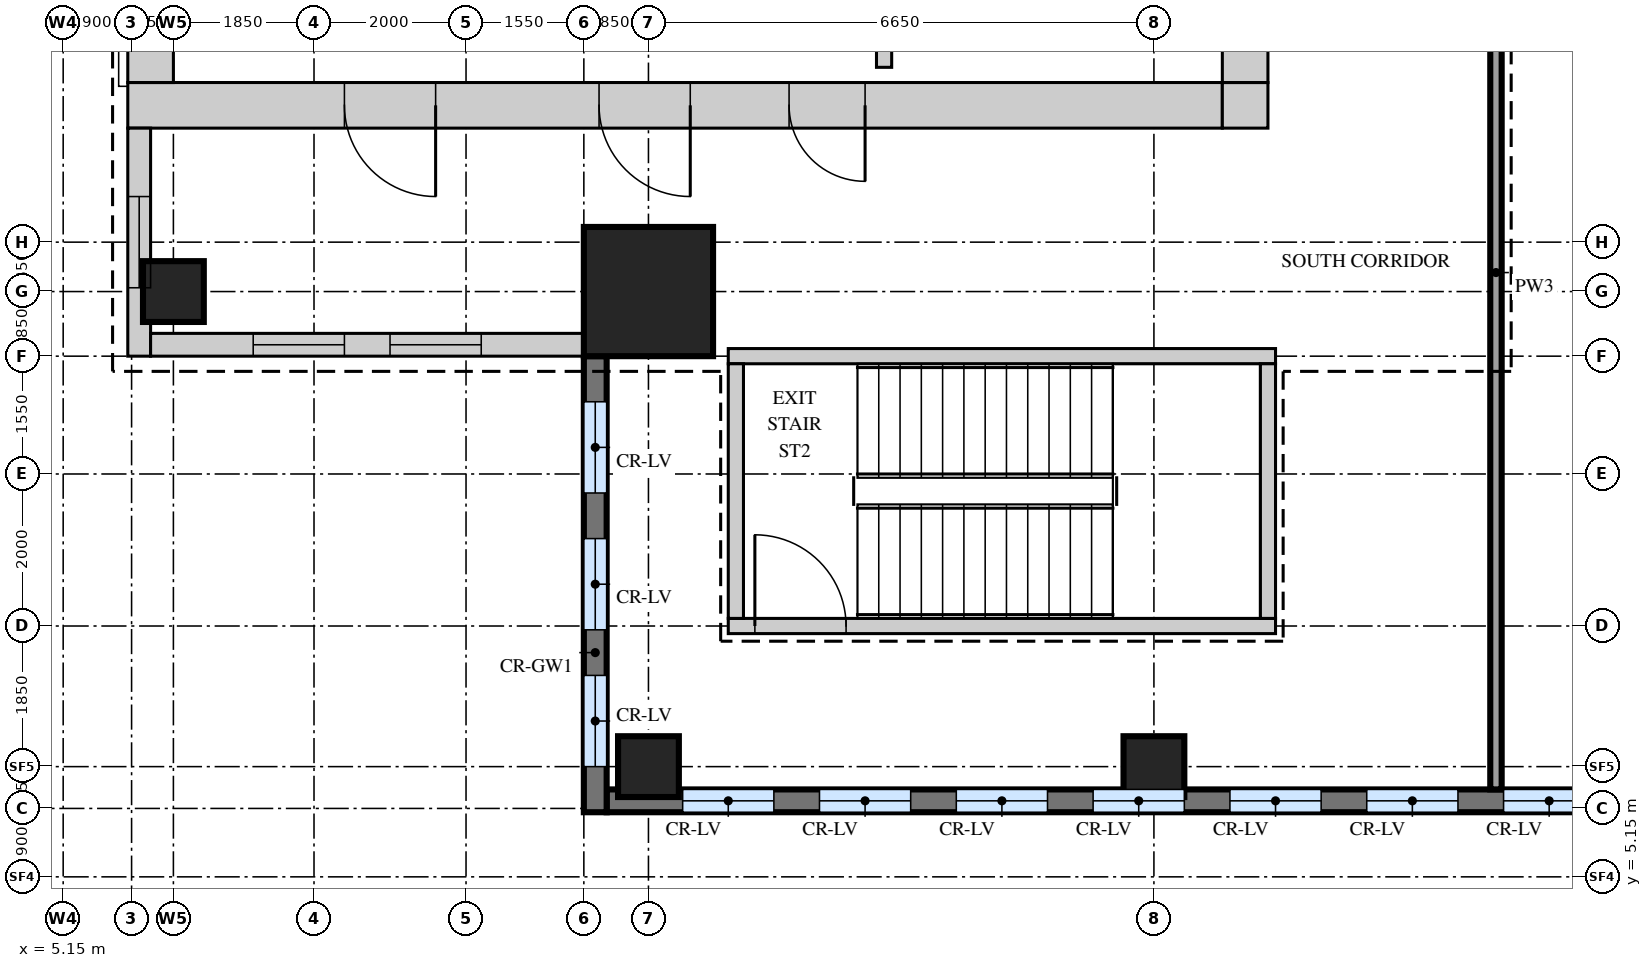
"""IFC4 building model, lengths in metres.
Left out: names, types, materials, properties, quantities, classifications, styles, units other than length and angle.
Written with IfcOpenShell. Run it as: python <this file> out.ifc"""

import sys

from ifc_helpers import new_model, si_unit, direction, frame, frame_2d, origin, origin_2d, place, context, subcontext, project, spatial, rectangle, extrude, source, transform, mapped, element, fill, save


model = new_model("IFC4")
c1 = context("Model", 3, precision=1e-05, world=origin(), true_north=direction((0.0, 1.0)))
c2 = subcontext(c1, "Body", "Model", "MODEL_VIEW")
j1 = project(units=[si_unit("LENGTHUNIT", "METRE"), si_unit("PLANEANGLEUNIT", "RADIAN")], contexts=[c1])
p1 = place(None, origin())
s1 = spatial("IfcSite", under=j1, at=p1, CompositionType="ELEMENT")
p2 = place(p1, origin())
s2 = spatial("IfcBuilding", under=s1, at=p2, CompositionType="ELEMENT")
p3 = place(p2, frame((0.0, 0.0, 343.7)))
s3 = spatial("IfcBuildingStorey", under=s2, at=p3, CompositionType="ELEMENT", Elevation=343.7)
m1 = source(origin(), c2, "Body", "SweptSolid", [
    extrude(rectangle(XDim=14.4, YDim=0.6, at=frame_2d((7.2, 0.0))), origin(), (0.0, 0.0, 1.0), 4.25),
])
p4 = place(p3, frame((6.0, 15.3, 0.0), z_axis=(0.0, 0.0, 1.0), x_axis=(1.0, 0.0, 0.0)))
e1 = element("IfcWall", 1, at=p4, inside=s3, PredefinedType="SHEAR", context=c2, shape_type="MappedRepresentation", body=[
    mapped(m1, transform((0.0, 0.0, 0.0))),
])
m2 = source(origin(), c2, "Body", "SweptSolid", [
    extrude(rectangle(XDim=1.2, YDim=2.1, at=frame_2d((0.6, 1.05))), frame((0.0, 0.31, 0.0), z_axis=(0.0, -1.0, 0.0), x_axis=(1.0, 0.0, 0.0)), (0.0, 0.0, 1.0), 0.62),
])
p5 = place(p4, frame((6.2, 0.0, 0.0)))
e2 = element("IfcOpeningElement", 2, at=p5, cuts=e1, PredefinedType="OPENING", context=c2, shape_type="MappedRepresentation", body=[
    mapped(m2, transform((0.0, 0.0, 0.0))),
])
p6 = place(p4, frame((2.85, 0.0, 0.0)))
e3 = element("IfcOpeningElement", 3, at=p6, cuts=e1, PredefinedType="OPENING", context=c2, shape_type="MappedRepresentation", body=[
    mapped(m2, transform((0.0, 0.0, 0.0))),
])
m3 = source(origin(), c2, "Body", "SweptSolid", [
    extrude(rectangle(XDim=1.0, YDim=2.1, at=frame_2d((0.5, 1.05))), frame((0.0, 0.31, 0.0), z_axis=(0.0, -1.0, 0.0), x_axis=(1.0, 0.0, 0.0)), (0.0, 0.0, 1.0), 0.62),
])
p7 = place(p4, frame((8.7, 0.0, 0.0)))
e4 = element("IfcOpeningElement", 4, at=p7, cuts=e1, PredefinedType="OPENING", context=c2, shape_type="MappedRepresentation", body=[
    mapped(m3, transform((0.0, 0.0, 0.0))),
])
m4 = source(origin(), c2, "Body", "SweptSolid", [
    extrude(rectangle(XDim=0.6, YDim=0.6, at=frame_2d((0.3, 0.0))), origin(), (0.0, 0.0, 1.0), 4.25),
])
p8 = place(p3, frame((20.4, 15.3, 0.0), z_axis=(0.0, 0.0, 1.0), x_axis=(1.0, 0.0, 0.0)))
e5 = element("IfcWall", 5, at=p8, inside=s3, PredefinedType="SHEAR", context=c2, shape_type="MappedRepresentation", body=[
    mapped(m4, transform((0.0, 0.0, 0.0))),
])
m5 = source(origin(), c2, "Body", "SweptSolid", [
    extrude(rectangle(XDim=22.8, YDim=0.6, at=frame_2d((11.4, 0.0))), origin(), (0.0, 0.0, 1.0), 4.25),
])
p9 = place(p3, frame((20.7, 15.6, 0.0), z_axis=(0.0, 0.0, 1.0), x_axis=(0.0, 1.0, 0.0)))
e6 = element("IfcWall", 6, at=p9, inside=s3, PredefinedType="SHEAR", context=c2, shape_type="MappedRepresentation", body=[
    mapped(m5, transform((0.0, 0.0, 0.0))),
])
m6 = source(origin(), c2, "Body", "SweptSolid", [
    extrude(rectangle(XDim=0.9, YDim=2.1, at=frame_2d((0.45, 1.05))), frame((0.0, 0.31, 0.0), z_axis=(0.0, -1.0, 0.0), x_axis=(1.0, 0.0, 0.0)), (0.0, 0.0, 1.0), 0.62),
])
p10 = place(p9, frame((8.2, 0.0, 0.0)))
e7 = element("IfcOpeningElement", 7, at=p10, cuts=e6, PredefinedType="OPENING", context=c2, shape_type="MappedRepresentation", body=[
    mapped(m6, transform((0.0, 0.0, 0.0))),
])
p11 = place(p9, frame((11.35, 0.0, 0.0)))
e8 = element("IfcOpeningElement", 8, at=p11, cuts=e6, PredefinedType="OPENING", context=c2, shape_type="MappedRepresentation", body=[
    mapped(m6, transform((0.0, 0.0, 0.0))),
])
p12 = place(p9, frame((14.65, 0.0, 0.0)))
e9 = element("IfcOpeningElement", 9, at=p12, cuts=e6, PredefinedType="OPENING", context=c2, shape_type="MappedRepresentation", body=[
    mapped(m6, transform((0.0, 0.0, 0.0))),
])
p13 = place(p9, frame((1.55, 0.0, 0.0)))
e10 = element("IfcOpeningElement", 10, at=p13, cuts=e6, PredefinedType="OPENING", context=c2, shape_type="MappedRepresentation", body=[
    mapped(m6, transform((0.0, 0.0, 0.0))),
])
p14 = place(p9, frame((5.1, 0.0, 0.0)))
e11 = element("IfcOpeningElement", 11, at=p14, cuts=e6, PredefinedType="OPENING", context=c2, shape_type="MappedRepresentation", body=[
    mapped(m6, transform((0.0, 0.0, 0.0))),
])
p15 = place(p3, frame((6.3, 15.6, 0.0), z_axis=(0.0, 0.0, 1.0), x_axis=(0.0, 1.0, 0.0)))
e12 = element("IfcWall", 12, at=p15, inside=s3, PredefinedType="SHEAR", context=c2, shape_type="MappedRepresentation", body=[
    mapped(m5, transform((0.0, 0.0, 0.0))),
])
m7 = source(origin(), c2, "Body", "SweptSolid", [
    extrude(rectangle(XDim=7.2, YDim=0.2, at=frame_2d((3.6, 0.0))), origin(), (0.0, 0.0, 1.0), 4.25),
])
p16 = place(p3, frame((13.9, 12.0, 0.0), z_axis=(0.0, 0.0, 1.0), x_axis=(1.0, 0.0, 0.0)))
e13 = element("IfcWall", 13, at=p16, inside=s3, PredefinedType="SHEAR", context=c2, shape_type="MappedRepresentation", body=[
    mapped(m7, transform((0.0, 0.0, 0.0))),
])
p17 = place(p3, frame((13.9, 8.45, 0.0), z_axis=(0.0, 0.0, 1.0), x_axis=(1.0, 0.0, 0.0)))
e14 = element("IfcWall", 14, at=p17, inside=s3, PredefinedType="SHEAR", context=c2, shape_type="MappedRepresentation", body=[
    mapped(m7, transform((0.0, 0.0, 0.0))),
])
m8 = source(origin(), c2, "Body", "SweptSolid", [
    extrude(rectangle(XDim=1.2, YDim=2.1, at=frame_2d((0.6, 1.05))), frame((0.0, 0.11, 0.0), z_axis=(0.0, -1.0, 0.0), x_axis=(1.0, 0.0, 0.0)), (0.0, 0.0, 1.0), 0.22),
])
p18 = place(p17, frame((0.35, 0.0, 0.0)))
e15 = element("IfcOpeningElement", 15, at=p18, cuts=e14, PredefinedType="OPENING", context=c2, shape_type="MappedRepresentation", body=[
    mapped(m8, transform((0.0, 0.0, 0.0))),
])
m9 = source(origin(), c2, "Body", "SweptSolid", [
    extrude(rectangle(XDim=3.35, YDim=0.2, at=frame_2d((1.675, 0.0))), origin(), (0.0, 0.0, 1.0), 4.25),
])
for number, where, z_axis, x_axis in (
    (16, (21.0, 8.55, 0.0), (0.0, 0.0, 1.0), (0.0, 1.0, 0.0)),
    (17, (14.0, 8.55, 0.0), (0.0, 0.0, 1.0), (0.0, 1.0, 0.0)),
):
    element("IfcWall", number, at=place(p3, frame(where, z_axis=z_axis, x_axis=x_axis)), inside=s3, PredefinedType="SHEAR", context=c2, shape_type="MappedRepresentation", body=[
        mapped(m9, transform((0.0, 0.0, 0.0))),
    ])
m10 = source(origin(), c2, "Body", "SweptSolid", [
    extrude(rectangle(XDim=1.7, YDim=1.7, at=origin_2d()), origin(), (0.0, 0.0, 1.0), 4.5),
])
p19 = place(p3, frame((12.85, 12.85, 0.0), z_axis=(0.0, 0.0, 1.0), x_axis=(1.0, 0.0, 0.0)))
e18 = element("IfcColumn", 18, at=p19, inside=s3, PredefinedType="COLUMN", context=c2, shape_type="MappedRepresentation", body=[
    mapped(m10, transform((0.0, 0.0, 0.0))),
])
m11 = source(origin(), c2, "Body", "SweptSolid", [
    extrude(rectangle(XDim=0.8, YDim=0.8, at=origin_2d()), origin(), (0.0, 0.0, 1.0), 4.5),
])
for number, where, z_axis, x_axis in (
    (19, (12.85, 6.6, 0.0), (0.0, 0.0, 1.0), (1.0, 0.0, 0.0)),
    (20, (19.5, 6.6, 0.0), (0.0, 0.0, 1.0), (1.0, 0.0, 0.0)),
    (21, (6.6, 12.85, 0.0), (0.0, 0.0, 1.0), (1.0, 0.0, 0.0)),
):
    element("IfcColumn", number, at=place(p3, frame(where, z_axis=z_axis, x_axis=x_axis)), inside=s3, PredefinedType="COLUMN", context=c2, shape_type="MappedRepresentation", body=[
        mapped(m11, transform((0.0, 0.0, 0.0))),
    ])
m12 = source(origin(), c2, "Body", "SweptSolid", [
    extrude(rectangle(XDim=15.823, YDim=0.3, at=frame_2d((7.911, 0.0))), origin(), (0.0, 0.0, 1.0), 4.5),
])
p20 = place(p3, frame((12.3, 6.15, 0.0), z_axis=(0.0, 0.0, 1.0), x_axis=(1.0, 0.0, 0.0)))
e22 = element("IfcWall", 22, at=p20, inside=s3, PredefinedType="SOLIDWALL", context=c2, shape_type="MappedRepresentation", body=[
    mapped(m12, transform((0.0, 0.0, 0.0))),
])
m13 = source(origin(), c2, "Body", "SweptSolid", [
    extrude(rectangle(XDim=1.2, YDim=2.4, at=frame_2d((0.6, 1.2))), frame((0.0, 0.16, 0.0), z_axis=(0.0, -1.0, 0.0), x_axis=(1.0, 0.0, 0.0)), (0.0, 0.0, 1.0), 0.32),
])
p21 = place(p20, frame((1.0, 0.0, 0.9)))
e23 = element("IfcOpeningElement", 23, at=p21, cuts=e22, PredefinedType="OPENING", context=c2, shape_type="MappedRepresentation", body=[
    mapped(m13, transform((0.0, 0.0, 0.0))),
])
p22 = place(p20, frame((2.8, 0.0, 0.9)))
e24 = element("IfcOpeningElement", 24, at=p22, cuts=e22, PredefinedType="OPENING", context=c2, shape_type="MappedRepresentation", body=[
    mapped(m13, transform((0.0, 0.0, 0.0))),
])
p23 = place(p20, frame((4.6, 0.0, 0.9)))
e25 = element("IfcOpeningElement", 25, at=p23, cuts=e22, PredefinedType="OPENING", context=c2, shape_type="MappedRepresentation", body=[
    mapped(m13, transform((0.0, 0.0, 0.0))),
])
p24 = place(p20, frame((6.4, 0.0, 0.9)))
e26 = element("IfcOpeningElement", 26, at=p24, cuts=e22, PredefinedType="OPENING", context=c2, shape_type="MappedRepresentation", body=[
    mapped(m13, transform((0.0, 0.0, 0.0))),
])
p25 = place(p20, frame((8.2, 0.0, 0.9)))
e27 = element("IfcOpeningElement", 27, at=p25, cuts=e22, PredefinedType="OPENING", context=c2, shape_type="MappedRepresentation", body=[
    mapped(m13, transform((0.0, 0.0, 0.0))),
])
p26 = place(p20, frame((10.0, 0.0, 0.9)))
e28 = element("IfcOpeningElement", 28, at=p26, cuts=e22, PredefinedType="OPENING", context=c2, shape_type="MappedRepresentation", body=[
    mapped(m13, transform((0.0, 0.0, 0.0))),
])
p27 = place(p20, frame((11.8, 0.0, 0.9)))
e29 = element("IfcOpeningElement", 29, at=p27, cuts=e22, PredefinedType="OPENING", context=c2, shape_type="MappedRepresentation", body=[
    mapped(m13, transform((0.0, 0.0, 0.0))),
])
p28 = place(p20, frame((13.6, 0.0, 0.9)))
e30 = element("IfcOpeningElement", 30, at=p28, cuts=e22, PredefinedType="OPENING", context=c2, shape_type="MappedRepresentation", body=[
    mapped(m13, transform((0.0, 0.0, 0.0))),
])
m14 = source(origin(), c2, "Body", "SweptSolid", [
    extrude(rectangle(XDim=3.0, YDim=0.3, at=frame_2d((1.5, 0.0))), origin(), (0.0, 0.0, 1.0), 4.5),
])
p29 = place(p3, frame((6.15, 15.0, 0.0), z_axis=(0.0, 0.0, 1.0), x_axis=(0.0, -1.0, 0.0)))
e31 = element("IfcWall", 31, at=p29, inside=s3, PredefinedType="SOLIDWALL", context=c2, shape_type="MappedRepresentation", body=[
    mapped(m14, transform((0.0, 0.0, 0.0))),
])
p30 = place(p29, frame((0.9, 0.0, 0.9)))
e32 = element("IfcOpeningElement", 32, at=p30, cuts=e31, PredefinedType="OPENING", context=c2, shape_type="MappedRepresentation", body=[
    mapped(m13, transform((0.0, 0.0, 0.0))),
])
m15 = source(origin(), c2, "Body", "SweptSolid", [
    extrude(rectangle(XDim=5.7, YDim=0.3, at=frame_2d((2.85, 0.0))), origin(), (0.0, 0.0, 1.0), 4.5),
])
p31 = place(p3, frame((6.3, 12.15, 0.0), z_axis=(0.0, 0.0, 1.0), x_axis=(1.0, 0.0, 0.0)))
e33 = element("IfcWall", 33, at=p31, inside=s3, PredefinedType="SOLIDWALL", context=c2, shape_type="MappedRepresentation", body=[
    mapped(m15, transform((0.0, 0.0, 0.0))),
])
p32 = place(p31, frame((1.35, 0.0, 0.9)))
e34 = element("IfcOpeningElement", 34, at=p32, cuts=e33, PredefinedType="OPENING", context=c2, shape_type="MappedRepresentation", body=[
    mapped(m13, transform((0.0, 0.0, 0.0))),
])
p33 = place(p31, frame((3.15, 0.0, 0.9)))
e35 = element("IfcOpeningElement", 35, at=p33, cuts=e33, PredefinedType="OPENING", context=c2, shape_type="MappedRepresentation", body=[
    mapped(m13, transform((0.0, 0.0, 0.0))),
])
m16 = source(origin(), c2, "Body", "SweptSolid", [
    extrude(rectangle(XDim=6.0, YDim=0.3, at=frame_2d((3.0, 0.0))), origin(), (0.0, 0.0, 1.0), 4.5),
])
p34 = place(p3, frame((12.15, 12.0, 0.0), z_axis=(0.0, 0.0, 1.0), x_axis=(0.0, -1.0, 0.0)))
e36 = element("IfcWall", 36, at=p34, inside=s3, PredefinedType="SOLIDWALL", context=c2, shape_type="MappedRepresentation", body=[
    mapped(m16, transform((0.0, 0.0, 0.0))),
])
p35 = place(p34, frame((0.6, 0.0, 0.9)))
e37 = element("IfcOpeningElement", 37, at=p35, cuts=e36, PredefinedType="OPENING", context=c2, shape_type="MappedRepresentation", body=[
    mapped(m13, transform((0.0, 0.0, 0.0))),
])
p36 = place(p34, frame((2.4, 0.0, 0.9)))
e38 = element("IfcOpeningElement", 38, at=p36, cuts=e36, PredefinedType="OPENING", context=c2, shape_type="MappedRepresentation", body=[
    mapped(m13, transform((0.0, 0.0, 0.0))),
])
p37 = place(p34, frame((4.2, 0.0, 0.9)))
e39 = element("IfcOpeningElement", 39, at=p37, cuts=e36, PredefinedType="OPENING", context=c2, shape_type="MappedRepresentation", body=[
    mapped(m13, transform((0.0, 0.0, 0.0))),
])
m17 = source(origin(), c2, "Body", "SweptSolid", [
    extrude(rectangle(XDim=32.6, YDim=0.15, at=frame_2d((16.3, 0.0))), origin(), (0.0, 0.0, 1.0), 4.3),
])
p38 = place(p3, frame((24.0, 6.3, 0.0), z_axis=(0.0, 0.0, 1.0), x_axis=(0.0, 1.0, 0.0)))
e40 = element("IfcWall", 40, at=p38, inside=s3, PredefinedType="PARTITIONING", context=c2, shape_type="MappedRepresentation", body=[
    mapped(m17, transform((0.0, 0.0, 0.0))),
])
m18 = source(origin(), c2, "Body", "SweptSolid", [
    extrude(rectangle(XDim=1.2, YDim=2.1, at=frame_2d((0.6, 1.05))), frame((0.0, 0.085, 0.0), z_axis=(0.0, -1.0, 0.0), x_axis=(1.0, 0.0, 0.0)), (0.0, 0.0, 1.0), 0.17),
])
p39 = place(p38, frame((13.6, 0.0, 0.0)))
e41 = element("IfcOpeningElement", 41, at=p39, cuts=e40, PredefinedType="OPENING", context=c2, shape_type="MappedRepresentation", body=[
    mapped(m18, transform((0.0, 0.0, 0.0))),
])
m19 = source(origin(), c2, "Body", "SweptSolid", [
    extrude(rectangle(XDim=0.9, YDim=2.1, at=frame_2d((0.45, 1.05))), frame((0.0, 0.085, 0.0), z_axis=(0.0, -1.0, 0.0), x_axis=(1.0, 0.0, 0.0)), (0.0, 0.0, 1.0), 0.17),
])
p40 = place(p38, frame((25.9, 0.0, 0.0)))
e42 = element("IfcOpeningElement", 42, at=p40, cuts=e40, PredefinedType="OPENING", context=c2, shape_type="MappedRepresentation", body=[
    mapped(m19, transform((0.0, 0.0, 0.0))),
])
m20 = source(origin(), c2, "Body", "SweptSolid", [
    extrude(rectangle(XDim=3.4, YDim=0.2, at=frame_2d((1.7, 0.0))), origin(), (0.0, 0.0, 1.0), 4.3),
])
p41 = place(p3, frame((15.95, 15.8, 0.0), z_axis=(0.0, 0.0, 1.0), x_axis=(0.0, 1.0, 0.0)))
e43 = element("IfcWall", 43, at=p41, inside=s3, PredefinedType="PARTITIONING", context=c2, shape_type="MappedRepresentation", body=[
    mapped(m20, transform((0.0, 0.0, 0.0))),
])
m21 = source(origin(), c2, "Body", "SweptSolid", [
    extrude(rectangle(XDim=1.2, YDim=2.4, at=frame_2d((0.6, 1.2))), frame((0.0, 0.03, 0.0), z_axis=(0.0, -1.0, 0.0), x_axis=(1.0, 0.0, 0.0)), (0.0, 0.0, 1.0), 0.06),
])
p42 = place(p21, origin())
e44 = element("IfcWindow", 44, at=p42, inside=s3, PartitioningType="SINGLE_PANEL", PredefinedType="WINDOW", context=c2, shape_type="MappedRepresentation", body=[
    mapped(m21, transform((0.0, 0.0, 0.0))),
])
fill(e23, e44)
p43 = place(p22, origin())
e45 = element("IfcWindow", 45, at=p43, inside=s3, PartitioningType="SINGLE_PANEL", PredefinedType="WINDOW", context=c2, shape_type="MappedRepresentation", body=[
    mapped(m21, transform((0.0, 0.0, 0.0))),
])
fill(e24, e45)
p44 = place(p23, origin())
e46 = element("IfcWindow", 46, at=p44, inside=s3, PartitioningType="SINGLE_PANEL", PredefinedType="WINDOW", context=c2, shape_type="MappedRepresentation", body=[
    mapped(m21, transform((0.0, 0.0, 0.0))),
])
fill(e25, e46)
p45 = place(p24, origin())
e47 = element("IfcWindow", 47, at=p45, inside=s3, PartitioningType="SINGLE_PANEL", PredefinedType="WINDOW", context=c2, shape_type="MappedRepresentation", body=[
    mapped(m21, transform((0.0, 0.0, 0.0))),
])
fill(e26, e47)
p46 = place(p25, origin())
e48 = element("IfcWindow", 48, at=p46, inside=s3, PartitioningType="SINGLE_PANEL", PredefinedType="WINDOW", context=c2, shape_type="MappedRepresentation", body=[
    mapped(m21, transform((0.0, 0.0, 0.0))),
])
fill(e27, e48)
p47 = place(p26, origin())
e49 = element("IfcWindow", 49, at=p47, inside=s3, PartitioningType="SINGLE_PANEL", PredefinedType="WINDOW", context=c2, shape_type="MappedRepresentation", body=[
    mapped(m21, transform((0.0, 0.0, 0.0))),
])
fill(e28, e49)
p48 = place(p27, origin())
e50 = element("IfcWindow", 50, at=p48, inside=s3, PartitioningType="SINGLE_PANEL", PredefinedType="WINDOW", context=c2, shape_type="MappedRepresentation", body=[
    mapped(m21, transform((0.0, 0.0, 0.0))),
])
fill(e29, e50)
p49 = place(p30, origin())
e51 = element("IfcWindow", 51, at=p49, inside=s3, PartitioningType="SINGLE_PANEL", PredefinedType="WINDOW", context=c2, shape_type="MappedRepresentation", body=[
    mapped(m21, transform((0.0, 0.0, 0.0))),
])
fill(e32, e51)
p50 = place(p32, origin())
e52 = element("IfcWindow", 52, at=p50, inside=s3, PartitioningType="SINGLE_PANEL", PredefinedType="WINDOW", context=c2, shape_type="MappedRepresentation", body=[
    mapped(m21, transform((0.0, 0.0, 0.0))),
])
fill(e34, e52)
p51 = place(p33, origin())
e53 = element("IfcWindow", 53, at=p51, inside=s3, PartitioningType="SINGLE_PANEL", PredefinedType="WINDOW", context=c2, shape_type="MappedRepresentation", body=[
    mapped(m21, transform((0.0, 0.0, 0.0))),
])
fill(e35, e53)
p52 = place(p35, origin())
e54 = element("IfcWindow", 54, at=p52, inside=s3, PartitioningType="SINGLE_PANEL", PredefinedType="WINDOW", context=c2, shape_type="MappedRepresentation", body=[
    mapped(m21, transform((0.0, 0.0, 0.0))),
])
fill(e37, e54)
p53 = place(p36, origin())
e55 = element("IfcWindow", 55, at=p53, inside=s3, PartitioningType="SINGLE_PANEL", PredefinedType="WINDOW", context=c2, shape_type="MappedRepresentation", body=[
    mapped(m21, transform((0.0, 0.0, 0.0))),
])
fill(e38, e55)
p54 = place(p37, origin())
e56 = element("IfcWindow", 56, at=p54, inside=s3, PartitioningType="SINGLE_PANEL", PredefinedType="WINDOW", context=c2, shape_type="MappedRepresentation", body=[
    mapped(m21, transform((0.0, 0.0, 0.0))),
])
fill(e39, e56)
m22 = source(origin(), c2, "Body", "SweptSolid", [
    extrude(rectangle(XDim=1.2, YDim=2.1, at=frame_2d((0.6, 1.05))), frame((0.0, 0.25, 0.0), z_axis=(0.0, -1.0, 0.0), x_axis=(1.0, 0.0, 0.0)), (0.0, 0.0, 1.0), 0.5),
])
p55 = place(p5, origin())
e57 = element("IfcDoor", 57, at=p55, inside=s3, OperationType="SINGLE_SWING_RIGHT", PredefinedType="DOOR", context=c2, shape_type="MappedRepresentation", body=[
    mapped(m22, transform((0.0, 0.0, 0.0))),
])
fill(e2, e57)
p56 = place(p6, origin())
e58 = element("IfcDoor", 58, at=p56, inside=s3, OperationType="SINGLE_SWING_RIGHT", PredefinedType="DOOR", context=c2, shape_type="MappedRepresentation", body=[
    mapped(m22, transform((0.0, 0.0, 0.0))),
])
fill(e3, e58)
m23 = source(origin(), c2, "Body", "SweptSolid", [
    extrude(rectangle(XDim=1.0, YDim=2.1, at=frame_2d((0.5, 1.05))), frame((0.0, 0.25, 0.0), z_axis=(0.0, -1.0, 0.0), x_axis=(1.0, 0.0, 0.0)), (0.0, 0.0, 1.0), 0.5),
])
p57 = place(p7, origin())
e59 = element("IfcDoor", 59, at=p57, inside=s3, OperationType="SINGLE_SWING_RIGHT", PredefinedType="DOOR", context=c2, shape_type="MappedRepresentation", body=[
    mapped(m23, transform((0.0, 0.0, 0.0))),
])
fill(e4, e59)
m24 = source(origin(), c2, "Body", "SweptSolid", [
    extrude(rectangle(XDim=1.2, YDim=2.1, at=frame_2d((0.6, 1.05))), frame((0.0, 0.025, 0.0), z_axis=(0.0, -1.0, 0.0), x_axis=(1.0, 0.0, 0.0)), (0.0, 0.0, 1.0), 0.05),
])
p58 = place(p18, origin())
e60 = element("IfcDoor", 60, at=p58, inside=s3, OperationType="SINGLE_SWING_RIGHT", PredefinedType="DOOR", context=c2, shape_type="MappedRepresentation", body=[
    mapped(m24, transform((0.0, 0.0, 0.0))),
])
fill(e15, e60)
save(model, sys.argv[1])
